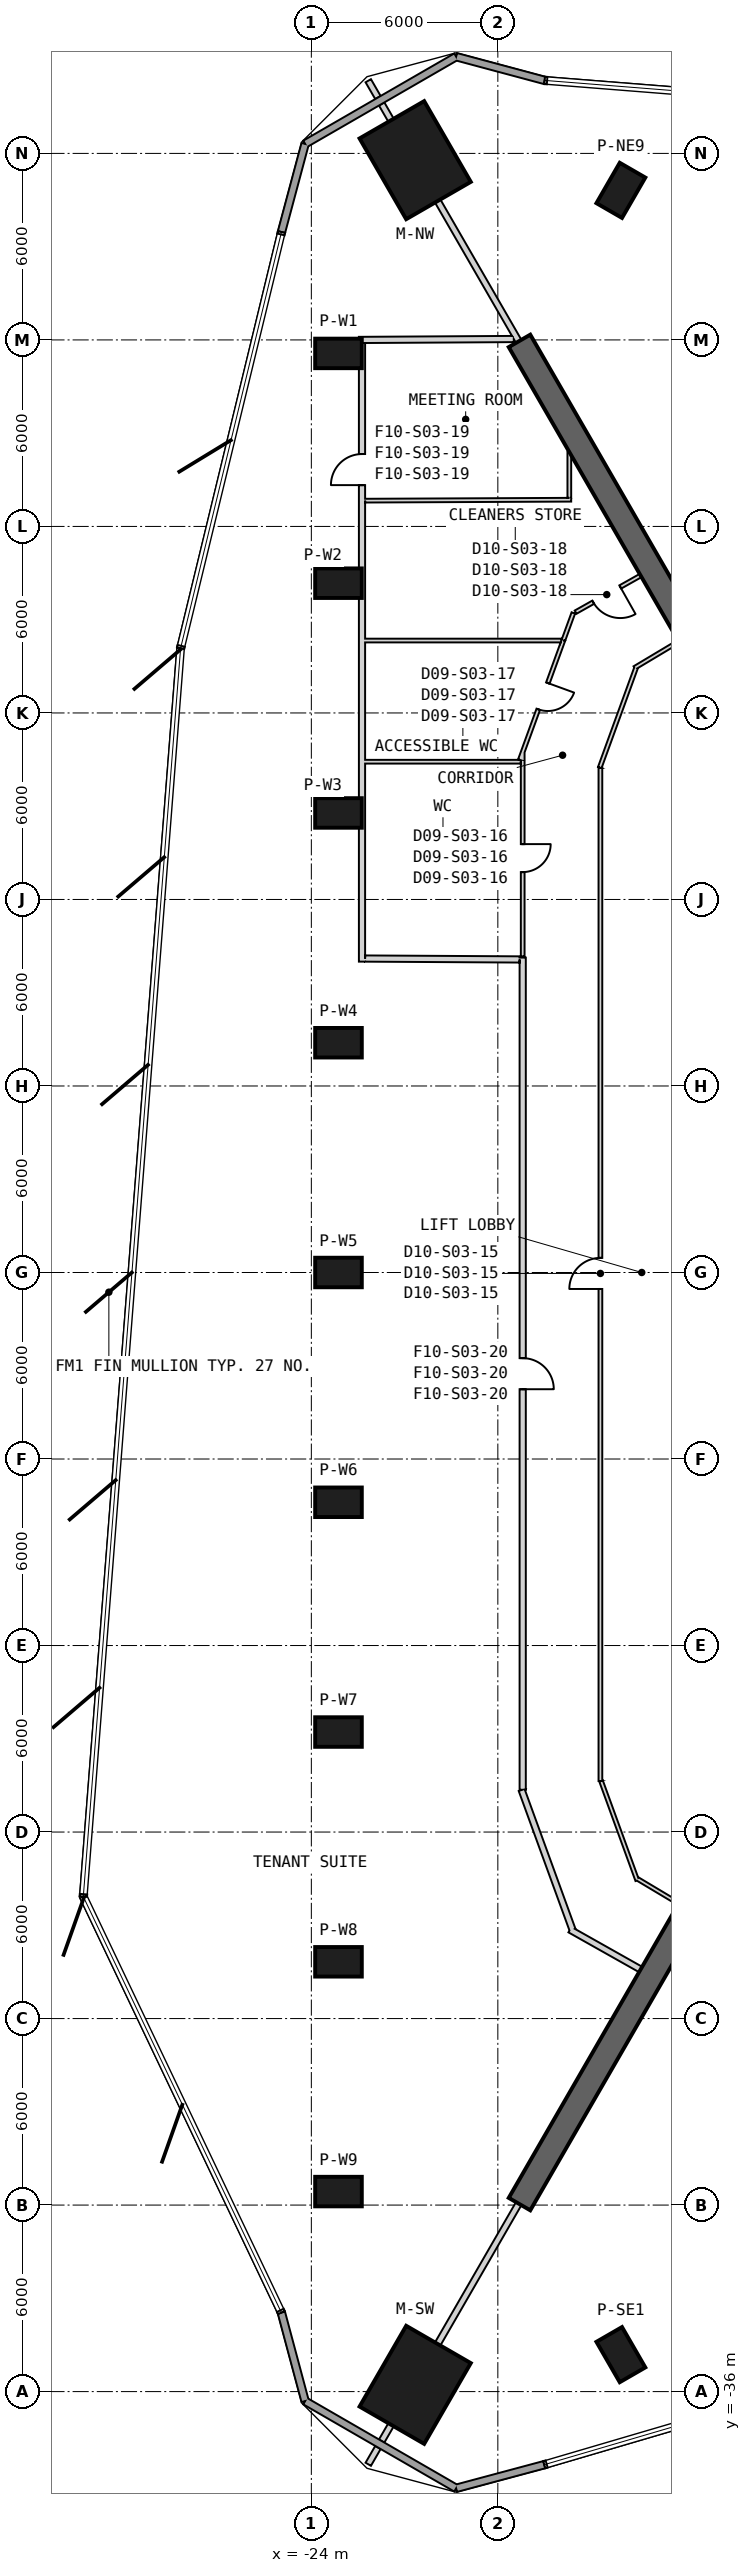
"""IFC4 building model, lengths in metres.
Left out: names, types, materials, properties, quantities, classifications, styles, units other than length and angle.
Written with IfcOpenShell. Run it as: python <this file> out.ifc"""

import sys

from ifc_helpers import new_model, si_unit, direction, frame, frame_2d, origin, origin_2d, place, context, subcontext, project, spatial, rectangle, extrude, element, fill, save


model = new_model("IFC4")
c1 = context("Model", 3, precision=1e-05, world=origin(), true_north=direction((0.0, 1.0)))
c2 = subcontext(c1, "Body", "Model", "MODEL_VIEW")
j1 = project(units=[si_unit("LENGTHUNIT", "METRE"), si_unit("PLANEANGLEUNIT", "RADIAN")], contexts=[c1])
p1 = place(None, origin())
s1 = spatial("IfcSite", under=j1, at=p1, CompositionType="ELEMENT")
p2 = place(p1, origin())
s2 = spatial("IfcBuilding", under=s1, at=p2, CompositionType="ELEMENT")
p3 = place(p2, frame((0.0, 0.0, 82.4)))
s3 = spatial("IfcBuildingStorey", under=s2, at=p3, CompositionType="ELEMENT", Elevation=82.4)
for number, where, z_axis, x_axis in (
    (1, (-20.659, 35.783, 0.0), (0.0, 0.0, 1.0), (-0.5, 0.866, 0.0)),
    (2, (-20.659, -35.783, 0.0), (0.0, 0.0, 1.0), (-0.5, -0.866, 0.0)),
):
    element("IfcColumn", number, at=place(p3, frame(where, z_axis=z_axis, x_axis=x_axis)), inside=s3, PredefinedType="COLUMN", context=c2, shape_type="SweptSolid", body=[
        extrude(rectangle(XDim=3.0, YDim=2.4, at=origin_2d()), origin(), (0.0, 0.0, 1.0), 4.1),
    ])
for number, where, z_axis, x_axis in (
    (3, (-23.127, 29.566, 0.0), (0.0, 0.0, 1.0), (-1.0, 0.0, 0.0)),
    (4, (-23.127, 22.174, 0.0), (0.0, 0.0, 1.0), (-1.0, 0.0, 0.0)),
    (5, (-23.127, 14.783, 0.0), (0.0, 0.0, 1.0), (-1.0, 0.0, 0.0)),
    (6, (-23.127, 7.391, 0.0), (0.0, 0.0, 1.0), (-1.0, 0.0, 0.0)),
    (7, (-23.127, 0.0, 0.0), (0.0, 0.0, 1.0), (-1.0, 0.0, 0.0)),
    (8, (-23.127, -7.391, 0.0), (0.0, 0.0, 1.0), (-1.0, 0.0, 0.0)),
    (9, (-23.127, -14.783, 0.0), (0.0, 0.0, 1.0), (-1.0, 0.0, 0.0)),
    (10, (-23.127, -22.174, 0.0), (0.0, 0.0, 1.0), (-1.0, 0.0, 0.0)),
    (11, (-23.127, -29.566, 0.0), (0.0, 0.0, 1.0), (-1.0, 0.0, 0.0)),
    (12, (-14.041, 34.811, 0.0), (0.0, 0.0, 1.0), (0.5, 0.866, 0.0)),
    (13, (-14.041, -34.811, 0.0), (0.0, 0.0, 1.0), (0.5, -0.866, 0.0)),
):
    element("IfcColumn", number, at=place(p3, frame(where, z_axis=z_axis, x_axis=x_axis)), inside=s3, PredefinedType="COLUMN", context=c2, shape_type="SweptSolid", body=[
        extrude(rectangle(XDim=1.5, YDim=0.95, at=origin_2d()), origin(), (0.0, 0.0, 1.0), 4.1),
    ])
p4 = place(p3, frame((-10.575, 18.316, 0.0), z_axis=(0.0, 0.0, 1.0), x_axis=(-0.499995223427, 0.866028161523, 0.0)))
e14 = element("IfcWall", 14, at=p4, inside=s3, PredefinedType="SHEAR", context=c2, shape_type="SweptSolid", body=[
    extrude(rectangle(XDim=13.455, YDim=0.8, at=frame_2d((6.728, 0.0))), origin(), (0.0, 0.0, 1.0), 4.1),
])
p5 = place(p4, frame((0.7, 0.0, 0.0)))
e15 = element("IfcOpeningElement", 15, at=p5, cuts=e14, PredefinedType="OPENING", context=c2, shape_type="SweptSolid", body=[
    extrude(rectangle(XDim=1.4, YDim=2.4, at=frame_2d((0.7, 1.2))), frame((0.0, 0.41, 0.0), z_axis=(0.0, -1.0, 0.0), x_axis=(1.0, 0.0, 0.0)), (0.0, 0.0, 1.0), 0.82),
])
p6 = place(p3, frame((-10.575, -18.316, 0.0), z_axis=(0.0, 0.0, 1.0), x_axis=(-0.499995223427, -0.866028161523, 0.0)))
e16 = element("IfcWall", 16, at=p6, inside=s3, PredefinedType="SHEAR", context=c2, shape_type="SweptSolid", body=[
    extrude(rectangle(XDim=13.455, YDim=0.8, at=frame_2d((6.728, 0.0))), origin(), (0.0, 0.0, 1.0), 4.1),
])
p7 = place(p6, frame((0.7, 0.0, 0.0)))
e17 = element("IfcOpeningElement", 17, at=p7, cuts=e16, PredefinedType="OPENING", context=c2, shape_type="SweptSolid", body=[
    extrude(rectangle(XDim=1.4, YDim=2.4, at=frame_2d((0.7, 1.2))), frame((0.0, 0.41, 0.0), z_axis=(0.0, -1.0, 0.0), x_axis=(1.0, 0.0, 0.0)), (0.0, 0.0, 1.0), 0.82),
])
p8 = place(p3, frame((-16.494, 38.349, 0.0), z_axis=(0.0, 0.0, 1.0), x_axis=(-0.965922171105, 0.258832686049, 0.0)))
e18 = element("IfcWall", 18, at=p8, inside=s3, PredefinedType="SOLIDWALL", context=c2, shape_type="SweptSolid", body=[
    extrude(rectangle(XDim=2.948, YDim=0.24, at=frame_2d((1.474, 0.0))), origin(), (0.0, 0.0, 1.0), 3.8),
])
p9 = place(p3, frame((-19.342, 39.112, 0.0), z_axis=(0.0, 0.0, 1.0), x_axis=(-0.866036326607, -0.499981080639, 0.0)))
e19 = element("IfcWall", 19, at=p9, inside=s3, PredefinedType="SOLIDWALL", context=c2, shape_type="SweptSolid", body=[
    extrude(rectangle(XDim=5.611, YDim=0.24, at=frame_2d((2.806, 0.0))), origin(), (0.0, 0.0, 1.0), 3.8),
])
p10 = place(p3, frame((-24.201, 36.306, 0.0), z_axis=(0.0, 0.0, 1.0), x_axis=(-0.258765188568, -0.965940255495, 0.0)))
e20 = element("IfcWall", 20, at=p10, inside=s3, PredefinedType="SOLIDWALL", context=c2, shape_type="SweptSolid", body=[
    extrude(rectangle(XDim=2.935, YDim=0.24, at=frame_2d((1.468, 0.0))), origin(), (0.0, 0.0, 1.0), 3.8),
])
p11 = place(p3, frame((-24.964, -33.459, 0.0), z_axis=(0.0, 0.0, 1.0), x_axis=(0.25875540601, -0.965942876086, 0.0)))
e21 = element("IfcWall", 21, at=p11, inside=s3, PredefinedType="SOLIDWALL", context=c2, shape_type="SweptSolid", body=[
    extrude(rectangle(XDim=2.948, YDim=0.24, at=frame_2d((1.474, 0.0))), origin(), (0.0, 0.0, 1.0), 3.8),
])
p12 = place(p3, frame((-24.201, -36.306, 0.0), z_axis=(0.0, 0.0, 1.0), x_axis=(0.866036326607, -0.499981080639, 0.0)))
e22 = element("IfcWall", 22, at=p12, inside=s3, PredefinedType="SOLIDWALL", context=c2, shape_type="SweptSolid", body=[
    extrude(rectangle(XDim=5.611, YDim=0.24, at=frame_2d((2.806, 0.0))), origin(), (0.0, 0.0, 1.0), 3.8),
])
p13 = place(p3, frame((-19.342, -39.112, 0.0), z_axis=(0.0, 0.0, 1.0), x_axis=(0.965919462467, 0.258842794041, 0.0)))
e23 = element("IfcWall", 23, at=p13, inside=s3, PredefinedType="SOLIDWALL", context=c2, shape_type="SweptSolid", body=[
    extrude(rectangle(XDim=2.935, YDim=0.24, at=frame_2d((1.468, 0.0))), origin(), (0.0, 0.0, 1.0), 3.8),
])
p14 = place(p3, frame((-12.181, 20.299, 0.0), z_axis=(0.0, 0.0, 1.0), x_axis=(-0.8583241935, -0.51310776534, 0.0)))
e24 = element("IfcWall", 24, at=p14, inside=s3, PredefinedType="PARTITIONING", context=c2, shape_type="SweptSolid", body=[
    extrude(rectangle(XDim=1.656, YDim=0.12, at=frame_2d((0.828, 0.0))), origin(), (0.0, 0.0, 1.0), 3.8),
])
p15 = place(p3, frame((-13.549, 19.461, 0.0), z_axis=(0.0, 0.0, 1.0), x_axis=(-0.341989191955, -0.939703885586, 0.0)))
e25 = element("IfcWall", 25, at=p15, inside=s3, PredefinedType="PARTITIONING", context=c2, shape_type="SweptSolid", body=[
    extrude(rectangle(XDim=3.425, YDim=0.12, at=frame_2d((1.712, 0.0))), origin(), (0.0, 0.0, 1.0), 2.88),
])
p16 = place(p3, frame((-14.7, -16.359, 0.0), z_axis=(0.0, 0.0, 1.0), x_axis=(0.0, 1.0, 0.0)))
e26 = element("IfcWall", 26, at=p16, inside=s3, PredefinedType="PARTITIONING", context=c2, shape_type="SweptSolid", body=[
    extrude(rectangle(XDim=32.599, YDim=0.12, at=frame_2d((16.299, 0.0))), origin(), (0.0, 0.0, 1.0), 2.98),
])
p17 = place(p16, frame((15.83, 0.0, 0.0)))
e27 = element("IfcOpeningElement", 27, at=p17, cuts=e26, PredefinedType="OPENING", context=c2, shape_type="SweptSolid", body=[
    extrude(rectangle(XDim=1.0, YDim=2.1, at=frame_2d((0.5, 1.05))), frame((0.0, 0.07, 0.0), z_axis=(0.0, -1.0, 0.0), x_axis=(1.0, 0.0, 0.0)), (0.0, 0.0, 1.0), 0.14),
])
p18 = place(p3, frame((-14.679, -16.356, 0.0), z_axis=(0.0, 0.0, 1.0), x_axis=(0.342002052592, -0.939699205077, 0.0)))
e28 = element("IfcWall", 28, at=p18, inside=s3, PredefinedType="PARTITIONING", context=c2, shape_type="SweptSolid", body=[
    extrude(rectangle(XDim=3.406, YDim=0.12, at=frame_2d((1.703, 0.0))), origin(), (0.0, 0.0, 1.0), 2.88),
])
p19 = place(p3, frame((-13.516, -19.501, 0.0), z_axis=(0.0, 0.0, 1.0), x_axis=(0.858336816023, -0.513086649856, 0.0)))
e29 = element("IfcWall", 29, at=p19, inside=s3, PredefinedType="PARTITIONING", context=c2, shape_type="SweptSolid", body=[
    extrude(rectangle(XDim=1.555, YDim=0.12, at=frame_2d((0.777, 0.0))), origin(), (0.0, 0.0, 1.0), 3.8),
])
p20 = place(p3, frame((-15.679, -21.14, 0.0), z_axis=(0.0, 0.0, 1.0), x_axis=(0.871170402172, -0.490980784124, 0.0)))
e30 = element("IfcWall", 30, at=p20, inside=s3, PredefinedType="PARTITIONING", context=c2, shape_type="SweptSolid", body=[
    extrude(rectangle(XDim=2.609, YDim=0.2, at=frame_2d((1.305, 0.0))), origin(), (0.0, 0.0, 1.0), 3.8),
])
p21 = place(p3, frame((-17.234, -16.646, 0.0), z_axis=(0.0, 0.0, 1.0), x_axis=(0.342004731639, -0.939698230038, 0.0)))
e31 = element("IfcWall", 31, at=p21, inside=s3, PredefinedType="PARTITIONING", context=c2, shape_type="SweptSolid", body=[
    extrude(rectangle(XDim=4.794, YDim=0.2, at=frame_2d((2.397, 0.0))), origin(), (0.0, 0.0, 1.0), 2.88),
])
p22 = place(p3, frame((-17.2, 10.13, 0.0), z_axis=(0.0, 0.0, 1.0), x_axis=(0.0, -1.0, 0.0)))
e32 = element("IfcWall", 32, at=p22, inside=s3, PredefinedType="PARTITIONING", context=c2, shape_type="SweptSolid", body=[
    extrude(rectangle(XDim=26.77, YDim=0.2, at=frame_2d((13.385, 0.0))), origin(), (0.0, 0.0, 1.0), 2.98),
])
p23 = place(p22, frame((12.885, 0.0, 0.0)))
e33 = element("IfcOpeningElement", 33, at=p23, cuts=e32, PredefinedType="OPENING", context=c2, shape_type="SweptSolid", body=[
    extrude(rectangle(XDim=1.0, YDim=2.1, at=frame_2d((0.5, 1.05))), frame((0.0, 0.11, 0.0), z_axis=(0.0, -1.0, 0.0), x_axis=(1.0, 0.0, 0.0)), (0.0, 0.0, 1.0), 0.22),
])
p24 = place(p3, frame((-17.2, 16.74, 0.0), z_axis=(0.0, 0.0, 1.0), x_axis=(0.0, -1.0, 0.0)))
e34 = element("IfcWall", 34, at=p24, inside=s3, PredefinedType="PARTITIONING", context=c2, shape_type="SweptSolid", body=[
    extrude(rectangle(XDim=6.57, YDim=0.12, at=frame_2d((3.285, 0.0))), origin(), (0.0, 0.0, 1.0), 2.98),
])
p25 = place(p24, frame((2.96, 0.0, 0.0)))
e35 = element("IfcOpeningElement", 35, at=p25, cuts=e34, PredefinedType="OPENING", context=c2, shape_type="SweptSolid", body=[
    extrude(rectangle(XDim=0.9, YDim=2.1, at=frame_2d((0.45, 1.05))), frame((0.0, 0.07, 0.0), z_axis=(0.0, -1.0, 0.0), x_axis=(1.0, 0.0, 0.0)), (0.0, 0.0, 1.0), 0.14),
])
p26 = place(p3, frame((-15.57, 21.218, 0.0), z_axis=(0.0, 0.0, 1.0), x_axis=(-0.342015355476, -0.939694363407, 0.0)))
e36 = element("IfcWall", 36, at=p26, inside=s3, PredefinedType="PARTITIONING", context=c2, shape_type="SweptSolid", body=[
    extrude(rectangle(XDim=0.936, YDim=0.12, at=frame_2d((0.468, 0.0))), origin(), (0.0, 0.0, 1.0), 2.88),
])
p27 = place(p3, frame((-15.89, 20.339, 0.0), z_axis=(0.0, 0.0, 1.0), x_axis=(-0.341977654868, -0.939708084232, 0.0)))
e37 = element("IfcWall", 37, at=p27, inside=s3, PredefinedType="PARTITIONING", context=c2, shape_type="SweptSolid", body=[
    extrude(rectangle(XDim=4.094, YDim=0.12, at=frame_2d((2.047, 0.0))), origin(), (0.0, 0.0, 1.0), 2.88),
])
p28 = place(p27, frame((1.465, 0.0, 0.0)))
e38 = element("IfcOpeningElement", 38, at=p28, cuts=e37, PredefinedType="OPENING", context=c2, shape_type="SweptSolid", body=[
    extrude(rectangle(XDim=0.9, YDim=2.1, at=frame_2d((0.45, 1.05))), frame((0.0, 0.07, 0.0), z_axis=(0.0, -1.0, 0.0), x_axis=(1.0, 0.0, 0.0)), (0.0, 0.0, 1.0), 0.14),
])
p29 = place(p3, frame((-13.406, 22.421, 0.0), z_axis=(0.0, 0.0, 1.0), x_axis=(-0.87117593963, -0.490970958622, 0.0)))
e39 = element("IfcWall", 39, at=p29, inside=s3, PredefinedType="PARTITIONING", context=c2, shape_type="SweptSolid", body=[
    extrude(rectangle(XDim=2.4, YDim=0.12, at=frame_2d((1.2, 0.0))), origin(), (0.0, 0.0, 1.0), 3.8),
])
p30 = place(p29, frame((0.75, 0.0, 0.0)))
e40 = element("IfcOpeningElement", 40, at=p30, cuts=e39, PredefinedType="OPENING", context=c2, shape_type="SweptSolid", body=[
    extrude(rectangle(XDim=1.0, YDim=2.1, at=frame_2d((0.5, 1.05))), frame((0.0, 0.07, 0.0), z_axis=(0.0, -1.0, 0.0), x_axis=(1.0, 0.0, 0.0)), (0.0, 0.0, 1.0), 0.14),
])
p31 = place(p3, frame((-22.169, 38.338, 0.0), z_axis=(0.0, 0.0, 1.0), x_axis=(0.499970989427, -0.866042152399, 0.0)))
e41 = element("IfcWall", 41, at=p31, inside=s3, PredefinedType="PARTITIONING", context=c2, shape_type="SweptSolid", body=[
    extrude(rectangle(XDim=0.624, YDim=0.2, at=frame_2d((0.312, 0.0))), origin(), (0.0, 0.0, 1.0), 3.8),
])
p32 = place(p3, frame((-21.737, 37.59, 0.0), z_axis=(0.0, 0.0, 1.0), x_axis=(0.499920697567, -0.866071184225, 0.0)))
e42 = element("IfcWall", 42, at=p32, inside=s3, PredefinedType="PARTITIONING", context=c2, shape_type="SweptSolid", body=[
    extrude(rectangle(XDim=0.604, YDim=0.2, at=frame_2d((0.302, 0.0))), origin(), (0.0, 0.0, 1.0), 3.8),
])
p33 = place(p3, frame((-19.935, 34.469, 0.0), z_axis=(0.0, 0.0, 1.0), x_axis=(0.49998731371, -0.866032728093, 0.0)))
e43 = element("IfcWall", 43, at=p33, inside=s3, PredefinedType="PARTITIONING", context=c2, shape_type="SweptSolid", body=[
    extrude(rectangle(XDim=5.213, YDim=0.2, at=frame_2d((2.606, 0.0))), origin(), (0.0, 0.0, 1.0), 3.37),
])
p34 = place(p3, frame((-22.169, -38.338, 0.0), z_axis=(0.0, 0.0, 1.0), x_axis=(0.499970989427, 0.866042152399, 0.0)))
e44 = element("IfcWall", 44, at=p34, inside=s3, PredefinedType="PARTITIONING", context=c2, shape_type="SweptSolid", body=[
    extrude(rectangle(XDim=0.624, YDim=0.2, at=frame_2d((0.312, 0.0))), origin(), (0.0, 0.0, 1.0), 3.8),
])
p35 = place(p3, frame((-21.737, -37.59, 0.0), z_axis=(0.0, 0.0, 1.0), x_axis=(0.499920697567, 0.866071184225, 0.0)))
e45 = element("IfcWall", 45, at=p35, inside=s3, PredefinedType="PARTITIONING", context=c2, shape_type="SweptSolid", body=[
    extrude(rectangle(XDim=0.604, YDim=0.2, at=frame_2d((0.302, 0.0))), origin(), (0.0, 0.0, 1.0), 3.8),
])
p36 = place(p3, frame((-19.935, -34.469, 0.0), z_axis=(0.0, 0.0, 1.0), x_axis=(0.49998731371, 0.866032728093, 0.0)))
e46 = element("IfcWall", 46, at=p36, inside=s3, PredefinedType="PARTITIONING", context=c2, shape_type="SweptSolid", body=[
    extrude(rectangle(XDim=5.213, YDim=0.2, at=frame_2d((2.606, 0.0))), origin(), (0.0, 0.0, 1.0), 3.37),
])
p37 = place(p3, frame((-22.37, 10.0, 0.0), z_axis=(0.0, 0.0, 1.0), x_axis=(0.0, 1.0, 0.0)))
e47 = element("IfcWall", 47, at=p37, inside=s3, PredefinedType="PARTITIONING", context=c2, shape_type="SweptSolid", body=[
    extrude(rectangle(XDim=6.431, YDim=0.2, at=frame_2d((3.216, 0.0))), origin(), (0.0, 0.0, 1.0), 3.08),
])
p38 = place(p3, frame((-22.37, 16.431, 0.0), z_axis=(0.0, 0.0, 1.0), x_axis=(0.0, 1.0, 0.0)))
e48 = element("IfcWall", 48, at=p38, inside=s3, PredefinedType="PARTITIONING", context=c2, shape_type="SweptSolid", body=[
    extrude(rectangle(XDim=3.898, YDim=0.2, at=frame_2d((1.949, 0.0))), origin(), (0.0, 0.0, 1.0), 3.8),
])
p39 = place(p3, frame((-22.37, 20.329, 0.0), z_axis=(0.0, 0.0, 1.0), x_axis=(0.0, 1.0, 0.0)))
e49 = element("IfcWall", 49, at=p39, inside=s3, PredefinedType="PARTITIONING", context=c2, shape_type="SweptSolid", body=[
    extrude(rectangle(XDim=4.5, YDim=0.2, at=frame_2d((2.25, 0.0))), origin(), (0.0, 0.0, 1.0), 2.98),
])
p40 = place(p3, frame((-22.37, 24.829, 0.0), z_axis=(0.0, 0.0, 1.0), x_axis=(0.0, 1.0, 0.0)))
e50 = element("IfcWall", 50, at=p40, inside=s3, PredefinedType="PARTITIONING", context=c2, shape_type="SweptSolid", body=[
    extrude(rectangle(XDim=5.071, YDim=0.2, at=frame_2d((2.535, 0.0))), origin(), (0.0, 0.0, 1.0), 2.88),
])
p41 = place(p40, frame((0.5, 0.0, 0.0)))
e51 = element("IfcOpeningElement", 51, at=p41, cuts=e50, PredefinedType="OPENING", context=c2, shape_type="SweptSolid", body=[
    extrude(rectangle(XDim=1.0, YDim=2.1, at=frame_2d((0.5, 1.05))), frame((0.0, 0.11, 0.0), z_axis=(0.0, -1.0, 0.0), x_axis=(1.0, 0.0, 0.0)), (0.0, 0.0, 1.0), 0.22),
])
p42 = place(p3, frame((-17.3, 10.071, 0.0), z_axis=(0.0, 0.0, 1.0), x_axis=(-0.999983200532, 0.005796434527, 0.0)))
e52 = element("IfcWall", 52, at=p42, inside=s3, PredefinedType="PARTITIONING", context=c2, shape_type="SweptSolid", body=[
    extrude(rectangle(XDim=4.97, YDim=0.2, at=frame_2d((2.485, 0.0))), origin(), (0.0, 0.0, 1.0), 3.8),
])
p43 = place(p3, frame((-17.487, 30.029, 0.0), z_axis=(0.0, 0.0, 1.0), x_axis=(-0.999982425384, -0.005928652725, 0.0)))
e53 = element("IfcWall", 53, at=p43, inside=s3, PredefinedType="PARTITIONING", context=c2, shape_type="SweptSolid", body=[
    extrude(rectangle(XDim=4.983, YDim=0.2, at=frame_2d((2.491, 0.0))), origin(), (0.0, 0.0, 1.0), 3.37),
])
p44 = place(p3, frame((-17.26, 16.431, 0.0), z_axis=(0.0, 0.0, 1.0), x_axis=(-1.0, 0.0, 0.0)))
e54 = element("IfcWall", 54, at=p44, inside=s3, PredefinedType="PARTITIONING", context=c2, shape_type="SweptSolid", body=[
    extrude(rectangle(XDim=5.01, YDim=0.12, at=frame_2d((2.505, 0.0))), origin(), (0.0, 0.0, 1.0), 2.98),
])
p45 = place(p3, frame((-22.27, 20.329, 0.0), z_axis=(0.0, 0.0, 1.0), x_axis=(1.0, 0.0, 0.0)))
e55 = element("IfcWall", 55, at=p45, inside=s3, PredefinedType="PARTITIONING", context=c2, shape_type="SweptSolid", body=[
    extrude(rectangle(XDim=6.312, YDim=0.12, at=frame_2d((3.156, 0.0))), origin(), (0.0, 0.0, 1.0), 2.88),
])
p46 = place(p3, frame((-15.64, 24.859, 0.0), z_axis=(0.0, 0.0, 1.0), x_axis=(-0.999989909342, -0.004492350736, 0.0)))
e56 = element("IfcWall", 56, at=p46, inside=s3, PredefinedType="PARTITIONING", context=c2, shape_type="SweptSolid", body=[
    extrude(rectangle(XDim=6.63, YDim=0.12, at=frame_2d((3.315, 0.0))), origin(), (0.0, 0.0, 1.0), 2.88),
])
p47 = place(p3, frame((-15.7, 24.919, 0.0), z_axis=(0.0, 0.0, 1.0), x_axis=(0.0, 1.0, 0.0)))
e57 = element("IfcWall", 57, at=p47, inside=s3, PredefinedType="PARTITIONING", context=c2, shape_type="SweptSolid", body=[
    extrude(rectangle(XDim=1.474, YDim=0.12, at=frame_2d((0.737, 0.0))), origin(), (0.0, 0.0, 1.0), 3.8),
])
p48 = place(p17, origin())
e58 = element("IfcDoor", 58, at=p48, inside=s3, OperationType="SINGLE_SWING_RIGHT", PredefinedType="NOTDEFINED", context=c2, shape_type="SweptSolid", body=[
    extrude(rectangle(XDim=1.0, YDim=2.1, at=frame_2d((0.5, 1.05))), frame((0.0, 0.025, 0.0), z_axis=(0.0, -1.0, 0.0), x_axis=(1.0, 0.0, 0.0)), (0.0, 0.0, 1.0), 0.05),
])
fill(e27, e58)
p49 = place(p25, origin())
e59 = element("IfcDoor", 59, at=p49, inside=s3, OperationType="SINGLE_SWING_RIGHT", PredefinedType="NOTDEFINED", context=c2, shape_type="SweptSolid", body=[
    extrude(rectangle(XDim=0.9, YDim=2.1, at=frame_2d((0.45, 1.05))), frame((0.0, 0.025, 0.0), z_axis=(0.0, -1.0, 0.0), x_axis=(1.0, 0.0, 0.0)), (0.0, 0.0, 1.0), 0.05),
])
fill(e35, e59)
p50 = place(p28, origin())
e60 = element("IfcDoor", 60, at=p50, inside=s3, OperationType="SINGLE_SWING_LEFT", PredefinedType="NOTDEFINED", context=c2, shape_type="SweptSolid", body=[
    extrude(rectangle(XDim=0.9, YDim=2.1, at=frame_2d((0.45, 1.05))), frame((0.0, 0.025, 0.0), z_axis=(0.0, -1.0, 0.0), x_axis=(1.0, 0.0, 0.0)), (0.0, 0.0, 1.0), 0.05),
])
fill(e38, e60)
p51 = place(p30, origin())
e61 = element("IfcDoor", 61, at=p51, inside=s3, OperationType="SINGLE_SWING_LEFT", PredefinedType="NOTDEFINED", context=c2, shape_type="SweptSolid", body=[
    extrude(rectangle(XDim=1.0, YDim=2.1, at=frame_2d((0.5, 1.05))), frame((0.0, 0.025, 0.0), z_axis=(0.0, -1.0, 0.0), x_axis=(1.0, 0.0, 0.0)), (0.0, 0.0, 1.0), 0.05),
])
fill(e40, e61)
p52 = place(p41, origin())
e62 = element("IfcDoor", 62, at=p52, inside=s3, OperationType="SINGLE_SWING_RIGHT", PredefinedType="USERDEFINED", context=c2, shape_type="SweptSolid", body=[
    extrude(rectangle(XDim=1.0, YDim=2.1, at=frame_2d((0.5, 1.05))), frame((0.0, 0.025, 0.0), z_axis=(0.0, -1.0, 0.0), x_axis=(1.0, 0.0, 0.0)), (0.0, 0.0, 1.0), 0.05),
])
fill(e51, e62)
p53 = place(p23, origin())
e63 = element("IfcDoor", 63, at=p53, inside=s3, OperationType="SINGLE_SWING_RIGHT", PredefinedType="USERDEFINED", context=c2, shape_type="SweptSolid", body=[
    extrude(rectangle(XDim=1.0, YDim=2.1, at=frame_2d((0.5, 1.05))), frame((0.0, 0.025, 0.0), z_axis=(0.0, -1.0, 0.0), x_axis=(1.0, 0.0, 0.0)), (0.0, 0.0, 1.0), 0.05),
])
fill(e33, e63)
save(model, sys.argv[1])
